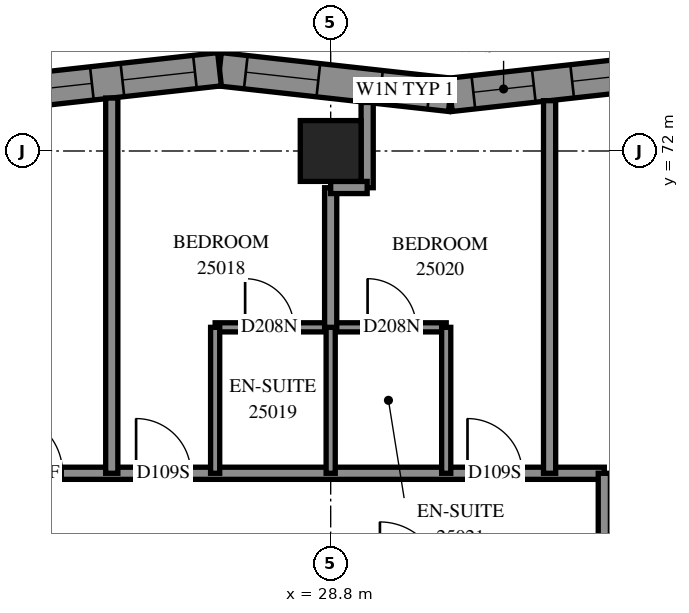
"""IFC4 building model, lengths in metres.
Left out: names, types, materials, properties, quantities, classifications, styles, units other than length and angle.
Written with IfcOpenShell. Run it as: python <this file> out.ifc"""

import sys

from ifc_helpers import new_model, si_unit, direction, frame, frame_2d, origin, origin_2d, place, context, subcontext, project, spatial, polyline, rectangle, outline, extrude, element, fill, save


model = new_model("IFC4")
c1 = context("Model", 3, precision=1e-05, world=origin(), true_north=direction((0.0, 1.0)))
c2 = subcontext(c1, "Body", "Model", "MODEL_VIEW")
j1 = project(units=[si_unit("LENGTHUNIT", "METRE"), si_unit("PLANEANGLEUNIT", "RADIAN")], contexts=[c1])
p1 = place(None, origin())
s1 = spatial("IfcSite", under=j1, at=p1, CompositionType="ELEMENT")
p2 = place(p1, origin())
s2 = spatial("IfcBuilding", under=s1, at=p2, CompositionType="ELEMENT")
p3 = place(p2, frame((0.0, 0.0, 94.8)))
s3 = spatial("IfcBuildingStorey", under=s2, at=p3, CompositionType="ELEMENT", Elevation=94.8)
p4 = place(p3, frame((28.8, 72.0, 0.0), z_axis=(0.0, 0.0, 1.0), x_axis=(1.0, 0.0, 0.0)))
e1 = element("IfcColumn", 1, at=p4, inside=s3, PredefinedType="COLUMN", context=c2, shape_type="SweptSolid", body=[
    extrude(rectangle(XDim=1.0, YDim=1.0, at=origin_2d()), origin(), (0.0, 0.0, 1.0), 3.1),
])
p5 = place(p3, frame((34.564, 73.344, 0.0), z_axis=(0.0, 0.0, 1.0), x_axis=(-0.993907338, -0.1102188888, 0.0)))
e2 = element("IfcWall", 2, at=p5, inside=s3, PredefinedType="SOLIDWALL", context=c2, shape_type="SweptSolid", body=[
    extrude(outline(polyline([(-0.03, -0.275), (3.789, -0.275), (3.85, 0.275), (0.03, 0.275), (-0.03, -0.275)])), origin(), (0.0, 0.0, 1.0), 3.1),
])
p6 = place(p5, frame((0.604, 0.0, 0.5)))
e3 = element("IfcOpeningElement", 3, at=p6, cuts=e2, PredefinedType="OPENING", context=c2, shape_type="SweptSolid", body=[
    extrude(rectangle(XDim=1.2, YDim=2.45, at=frame_2d((0.6, 1.225))), frame((0.0, 0.285, 0.0), z_axis=(0.0, -1.0, 0.0), x_axis=(1.0, 0.0, 0.0)), (0.0, 0.0, 1.0), 0.57),
])
p7 = place(p5, frame((2.439, 0.0, 0.45)))
e4 = element("IfcOpeningElement", 4, at=p7, cuts=e2, PredefinedType="OPENING", context=c2, shape_type="SweptSolid", body=[
    extrude(rectangle(XDim=1.0, YDim=2.5, at=frame_2d((0.5, 1.25))), frame((0.0, 0.285, 0.0), z_axis=(0.0, -1.0, 0.0), x_axis=(1.0, 0.0, 0.0)), (0.0, 0.0, 1.0), 0.57),
])
p8 = place(p3, frame((30.768, 72.923, 0.0), z_axis=(0.0, 0.0, 1.0), x_axis=(-0.99390702, 0.1102217568, 0.0)))
e5 = element("IfcWall", 5, at=p8, inside=s3, PredefinedType="SOLIDWALL", context=c2, shape_type="SweptSolid", body=[
    extrude(outline(polyline([(0.03, -0.275), (3.85, -0.275), (3.789, 0.275), (-0.03, 0.275), (0.03, -0.275)])), origin(), (0.0, 0.0, 1.0), 3.1),
])
p9 = place(p8, frame((2.184, 0.0, 0.5)))
e6 = element("IfcOpeningElement", 6, at=p9, cuts=e5, PredefinedType="OPENING", context=c2, shape_type="SweptSolid", body=[
    extrude(rectangle(XDim=1.2, YDim=2.45, at=frame_2d((0.6, 1.225))), frame((0.0, 0.285, 0.0), z_axis=(0.0, -1.0, 0.0), x_axis=(1.0, 0.0, 0.0)), (0.0, 0.0, 1.0), 0.57),
])
p10 = place(p8, frame((0.348, 0.0, 0.45)))
e7 = element("IfcOpeningElement", 7, at=p10, cuts=e5, PredefinedType="OPENING", context=c2, shape_type="SweptSolid", body=[
    extrude(rectangle(XDim=0.8, YDim=2.5, at=frame_2d((0.4, 1.25))), frame((0.0, 0.285, 0.0), z_axis=(0.0, -1.0, 0.0), x_axis=(1.0, 0.0, 0.0)), (0.0, 0.0, 1.0), 0.57),
])
p11 = place(p3, frame((26.972, 73.344, 0.0), z_axis=(0.0, 0.0, 1.0), x_axis=(-0.9939087915, -0.1102057815, 0.0)))
e8 = element("IfcWall", 8, at=p11, inside=s3, PredefinedType="SOLIDWALL", context=c2, shape_type="SweptSolid", body=[
    extrude(outline(polyline([(-0.03, -0.275), (3.789, -0.275), (3.893, 0.275), (0.03, 0.275), (-0.03, -0.275)])), origin(), (0.0, 0.0, 1.0), 3.1),
])
p12 = place(p11, frame((0.406, 0.0, 0.5)))
e9 = element("IfcOpeningElement", 9, at=p12, cuts=e8, PredefinedType="OPENING", context=c2, shape_type="SweptSolid", body=[
    extrude(rectangle(XDim=1.2, YDim=2.45, at=frame_2d((0.6, 1.225))), frame((0.0, 0.285, 0.0), z_axis=(0.0, -1.0, 0.0), x_axis=(1.0, 0.0, 0.0)), (0.0, 0.0, 1.0), 0.57),
])
p13 = place(p11, frame((2.112, 0.0, 0.5)))
e10 = element("IfcOpeningElement", 10, at=p13, cuts=e8, PredefinedType="OPENING", context=c2, shape_type="SweptSolid", body=[
    extrude(rectangle(XDim=1.2, YDim=2.45, at=frame_2d((0.6, 1.225))), frame((0.0, 0.285, 0.0), z_axis=(0.0, -1.0, 0.0), x_axis=(1.0, 0.0, 0.0)), (0.0, 0.0, 1.0), 0.57),
])
p14 = place(p3, frame((21.602, 66.7, 0.0), z_axis=(0.0, 0.0, 1.0), x_axis=(1.0, 0.0, 0.0)))
e11 = element("IfcWall", 11, at=p14, inside=s3, PredefinedType="PARTITIONING", context=c2, shape_type="SweptSolid", body=[
    extrude(rectangle(XDim=11.698, YDim=0.2, at=frame_2d((5.849, 0.0))), origin(), (0.0, 0.0, 1.0), 3.1),
])
p15 = place(p14, frame((1.79, 0.0, 0.0)))
e12 = element("IfcOpeningElement", 12, at=p15, cuts=e11, PredefinedType="OPENING", context=c2, shape_type="SweptSolid", body=[
    extrude(rectangle(XDim=1.0, YDim=2.1, at=frame_2d((0.5, 1.05))), frame((0.0, 0.11, 0.0), z_axis=(0.0, -1.0, 0.0), x_axis=(1.0, 0.0, 0.0)), (0.0, 0.0, 1.0), 0.22),
])
p16 = place(p14, frame((3.998, 0.0, 0.0)))
e13 = element("IfcOpeningElement", 13, at=p16, cuts=e11, PredefinedType="OPENING", context=c2, shape_type="SweptSolid", body=[
    extrude(rectangle(XDim=0.9, YDim=2.1, at=frame_2d((0.45, 1.05))), frame((0.0, 0.11, 0.0), z_axis=(0.0, -1.0, 0.0), x_axis=(1.0, 0.0, 0.0)), (0.0, 0.0, 1.0), 0.22),
])
p17 = place(p14, frame((9.448, 0.0, 0.0)))
e14 = element("IfcOpeningElement", 14, at=p17, cuts=e11, PredefinedType="OPENING", context=c2, shape_type="SweptSolid", body=[
    extrude(rectangle(XDim=0.9, YDim=2.1, at=frame_2d((0.45, 1.05))), frame((0.0, 0.11, 0.0), z_axis=(0.0, -1.0, 0.0), x_axis=(1.0, 0.0, 0.0)), (0.0, 0.0, 1.0), 0.22),
])
p18 = place(p3, frame((25.2, 66.7, 0.0), z_axis=(0.0, 0.0, 1.0), x_axis=(0.0, 1.0, 0.0)))
e15 = element("IfcWall", 15, at=p18, inside=s3, PredefinedType="PARTITIONING", context=c2, shape_type="SweptSolid", body=[
    extrude(rectangle(XDim=6.171, YDim=0.2, at=frame_2d((3.086, 0.0))), origin(), (0.0, 0.0, 1.0), 3.1),
])
p19 = place(p3, frame((32.4, 66.7, 0.0), z_axis=(0.0, 0.0, 1.0), x_axis=(0.0, 1.0, 0.0)))
e16 = element("IfcWall", 16, at=p19, inside=s3, PredefinedType="PARTITIONING", context=c2, shape_type="SweptSolid", body=[
    extrude(rectangle(XDim=6.128, YDim=0.2, at=frame_2d((3.064, 0.0))), origin(), (0.0, 0.0, 1.0), 3.1),
])
p20 = place(p3, frame((33.3, 62.102, 0.0), z_axis=(0.0, 0.0, 1.0), x_axis=(0.0, 1.0, 0.0)))
e17 = element("IfcWall", 17, at=p20, inside=s3, PredefinedType="PARTITIONING", context=c2, shape_type="SweptSolid", body=[
    extrude(rectangle(XDim=4.598, YDim=0.2, at=frame_2d((2.299, 0.0))), origin(), (0.0, 0.0, 1.0), 3.1),
])
p21 = place(p20, frame((2.501, 0.0, 0.0)))
e18 = element("IfcOpeningElement", 18, at=p21, cuts=e17, PredefinedType="OPENING", context=c2, shape_type="SweptSolid", body=[
    extrude(rectangle(XDim=0.9, YDim=2.1, at=frame_2d((0.45, 1.05))), frame((0.0, 0.11, 0.0), z_axis=(0.0, -1.0, 0.0), x_axis=(1.0, 0.0, 0.0)), (0.0, 0.0, 1.0), 0.22),
])
p22 = place(p3, frame((26.9, 69.1, 0.0), z_axis=(0.0, 0.0, 1.0), x_axis=(1.0, 0.0, 0.0)))
e19 = element("IfcWall", 19, at=p22, inside=s3, PredefinedType="PARTITIONING", context=c2, shape_type="SweptSolid", body=[
    extrude(rectangle(XDim=3.8, YDim=0.15, at=frame_2d((1.9, 0.0))), origin(), (0.0, 0.0, 1.0), 3.1),
])
p23 = place(p22, frame((0.493, 0.0, 0.0)))
e20 = element("IfcOpeningElement", 20, at=p23, cuts=e19, PredefinedType="OPENING", context=c2, shape_type="SweptSolid", body=[
    extrude(rectangle(XDim=0.8, YDim=2.1, at=frame_2d((0.4, 1.05))), frame((0.0, 0.085, 0.0), z_axis=(0.0, -1.0, 0.0), x_axis=(1.0, 0.0, 0.0)), (0.0, 0.0, 1.0), 0.17),
])
p24 = place(p22, frame((2.507, 0.0, 0.0)))
e21 = element("IfcOpeningElement", 21, at=p24, cuts=e19, PredefinedType="OPENING", context=c2, shape_type="SweptSolid", body=[
    extrude(rectangle(XDim=0.8, YDim=2.1, at=frame_2d((0.4, 1.05))), frame((0.0, 0.085, 0.0), z_axis=(0.0, -1.0, 0.0), x_axis=(1.0, 0.0, 0.0)), (0.0, 0.0, 1.0), 0.17),
])
for number, where, z_axis, x_axis in (
    (22, (26.9, 66.7, 0.0), (0.0, 0.0, 1.0), (0.0, 1.0, 0.0)),
    (23, (28.8, 66.7, 0.0), (0.0, 0.0, 1.0), (0.0, 1.0, 0.0)),
    (24, (30.7, 66.7, 0.0), (0.0, 0.0, 1.0), (0.0, 1.0, 0.0)),
):
    element("IfcWall", number, at=place(p3, frame(where, z_axis=z_axis, x_axis=x_axis)), inside=s3, PredefinedType="PARTITIONING", context=c2, shape_type="SweptSolid", body=[
        extrude(rectangle(XDim=2.4, YDim=0.15, at=frame_2d((1.2, 0.0))), origin(), (0.0, 0.0, 1.0), 3.1),
    ])
p25 = place(p3, frame((28.8, 69.1, 0.0), z_axis=(0.0, 0.0, 1.0), x_axis=(0.0, 1.0, 0.0)))
e25 = element("IfcWall", 25, at=p25, inside=s3, PredefinedType="PARTITIONING", context=c2, shape_type="SweptSolid", body=[
    extrude(rectangle(XDim=2.296, YDim=0.2, at=frame_2d((1.148, 0.0))), origin(), (0.0, 0.0, 1.0), 3.1),
])
p26 = place(p3, frame((29.4, 71.396, 0.0), z_axis=(0.0, 0.0, 1.0), x_axis=(0.0, 1.0, 0.0)))
e26 = element("IfcWall", 26, at=p26, inside=s3, PredefinedType="PARTITIONING", context=c2, shape_type="SweptSolid", body=[
    extrude(rectangle(XDim=1.402, YDim=0.2, at=frame_2d((0.701, 0.0))), origin(), (0.0, 0.0, 1.0), 3.1),
])
p27 = place(p3, frame((28.8, 71.4, 0.0), z_axis=(0.0, 0.0, 1.0), x_axis=(1.0, 0.0, 0.0)))
e27 = element("IfcWall", 27, at=p27, inside=s3, PredefinedType="PARTITIONING", context=c2, shape_type="SweptSolid", body=[
    extrude(rectangle(XDim=0.6, YDim=0.2, at=frame_2d((0.3, 0.0))), origin(), (0.0, 0.0, 1.0), 3.1),
])
p28 = place(p6, origin())
e28 = element("IfcWindow", 28, at=p28, inside=s3, PartitioningType="SINGLE_PANEL", PredefinedType="WINDOW", context=c2, shape_type="SweptSolid", body=[
    extrude(rectangle(XDim=1.2, YDim=2.45, at=frame_2d((0.6, 1.225))), frame((0.0, 0.155, 0.0), z_axis=(0.0, -1.0, 0.0), x_axis=(1.0, 0.0, 0.0)), (0.0, 0.0, 1.0), 0.06),
])
fill(e3, e28)
p29 = place(p9, origin())
e29 = element("IfcWindow", 29, at=p29, inside=s3, PartitioningType="SINGLE_PANEL", PredefinedType="WINDOW", context=c2, shape_type="SweptSolid", body=[
    extrude(rectangle(XDim=1.2, YDim=2.45, at=frame_2d((0.6, 1.225))), frame((0.0, 0.155, 0.0), z_axis=(0.0, -1.0, 0.0), x_axis=(1.0, 0.0, 0.0)), (0.0, 0.0, 1.0), 0.06),
])
fill(e6, e29)
p30 = place(p12, origin())
e30 = element("IfcWindow", 30, at=p30, inside=s3, PartitioningType="SINGLE_PANEL", PredefinedType="WINDOW", context=c2, shape_type="SweptSolid", body=[
    extrude(rectangle(XDim=1.2, YDim=2.45, at=frame_2d((0.6, 1.225))), frame((0.0, 0.155, 0.0), z_axis=(0.0, -1.0, 0.0), x_axis=(1.0, 0.0, 0.0)), (0.0, 0.0, 1.0), 0.06),
])
fill(e9, e30)
p31 = place(p13, origin())
e31 = element("IfcWindow", 31, at=p31, inside=s3, PartitioningType="SINGLE_PANEL", PredefinedType="WINDOW", context=c2, shape_type="SweptSolid", body=[
    extrude(rectangle(XDim=1.2, YDim=2.45, at=frame_2d((0.6, 1.225))), frame((0.0, 0.155, 0.0), z_axis=(0.0, -1.0, 0.0), x_axis=(1.0, 0.0, 0.0)), (0.0, 0.0, 1.0), 0.06),
])
fill(e10, e31)
p32 = place(p15, origin())
e32 = element("IfcDoor", 32, at=p32, inside=s3, OperationType="SINGLE_SWING_RIGHT", PredefinedType="DOOR", context=c2, shape_type="SweptSolid", body=[
    extrude(rectangle(XDim=1.0, YDim=2.1, at=frame_2d((0.5, 1.05))), frame((0.0, 0.025, 0.0), z_axis=(0.0, -1.0, 0.0), x_axis=(1.0, 0.0, 0.0)), (0.0, 0.0, 1.0), 0.05),
])
fill(e12, e32)
p33 = place(p16, origin())
e33 = element("IfcDoor", 33, at=p33, inside=s3, OperationType="SINGLE_SWING_LEFT", PredefinedType="DOOR", context=c2, shape_type="SweptSolid", body=[
    extrude(rectangle(XDim=0.9, YDim=2.1, at=frame_2d((0.45, 1.05))), frame((0.0, 0.025, 0.0), z_axis=(0.0, -1.0, 0.0), x_axis=(1.0, 0.0, 0.0)), (0.0, 0.0, 1.0), 0.05),
])
fill(e13, e33)
p34 = place(p23, origin())
e34 = element("IfcDoor", 34, at=p34, inside=s3, OperationType="SINGLE_SWING_RIGHT", PredefinedType="DOOR", context=c2, shape_type="SweptSolid", body=[
    extrude(rectangle(XDim=0.8, YDim=2.1, at=frame_2d((0.4, 1.05))), frame((0.0, 0.025, 0.0), z_axis=(0.0, -1.0, 0.0), x_axis=(1.0, 0.0, 0.0)), (0.0, 0.0, 1.0), 0.05),
])
fill(e20, e34)
p35 = place(p17, origin())
e35 = element("IfcDoor", 35, at=p35, inside=s3, OperationType="SINGLE_SWING_RIGHT", PredefinedType="DOOR", context=c2, shape_type="SweptSolid", body=[
    extrude(rectangle(XDim=0.9, YDim=2.1, at=frame_2d((0.45, 1.05))), frame((0.0, 0.025, 0.0), z_axis=(0.0, -1.0, 0.0), x_axis=(1.0, 0.0, 0.0)), (0.0, 0.0, 1.0), 0.05),
])
fill(e14, e35)
p36 = place(p24, origin())
e36 = element("IfcDoor", 36, at=p36, inside=s3, OperationType="SINGLE_SWING_RIGHT", PredefinedType="DOOR", context=c2, shape_type="SweptSolid", body=[
    extrude(rectangle(XDim=0.8, YDim=2.1, at=frame_2d((0.4, 1.05))), frame((0.0, 0.025, 0.0), z_axis=(0.0, -1.0, 0.0), x_axis=(1.0, 0.0, 0.0)), (0.0, 0.0, 1.0), 0.05),
])
fill(e21, e36)
p37 = place(p7, origin())
e37 = element("IfcWindow", 37, at=p37, inside=s3, PartitioningType="SINGLE_PANEL", PredefinedType="WINDOW", context=c2, shape_type="SweptSolid", body=[
    extrude(rectangle(XDim=1.0, YDim=2.5, at=frame_2d((0.5, 1.25))), frame((0.0, 0.155, 0.0), z_axis=(0.0, -1.0, 0.0), x_axis=(1.0, 0.0, 0.0)), (0.0, 0.0, 1.0), 0.06),
])
fill(e4, e37)
p38 = place(p10, origin())
e38 = element("IfcWindow", 38, at=p38, inside=s3, PartitioningType="SINGLE_PANEL", PredefinedType="WINDOW", context=c2, shape_type="SweptSolid", body=[
    extrude(rectangle(XDim=0.8, YDim=2.5, at=frame_2d((0.4, 1.25))), frame((0.0, 0.155, 0.0), z_axis=(0.0, -1.0, 0.0), x_axis=(1.0, 0.0, 0.0)), (0.0, 0.0, 1.0), 0.06),
])
fill(e7, e38)
save(model, sys.argv[1])
